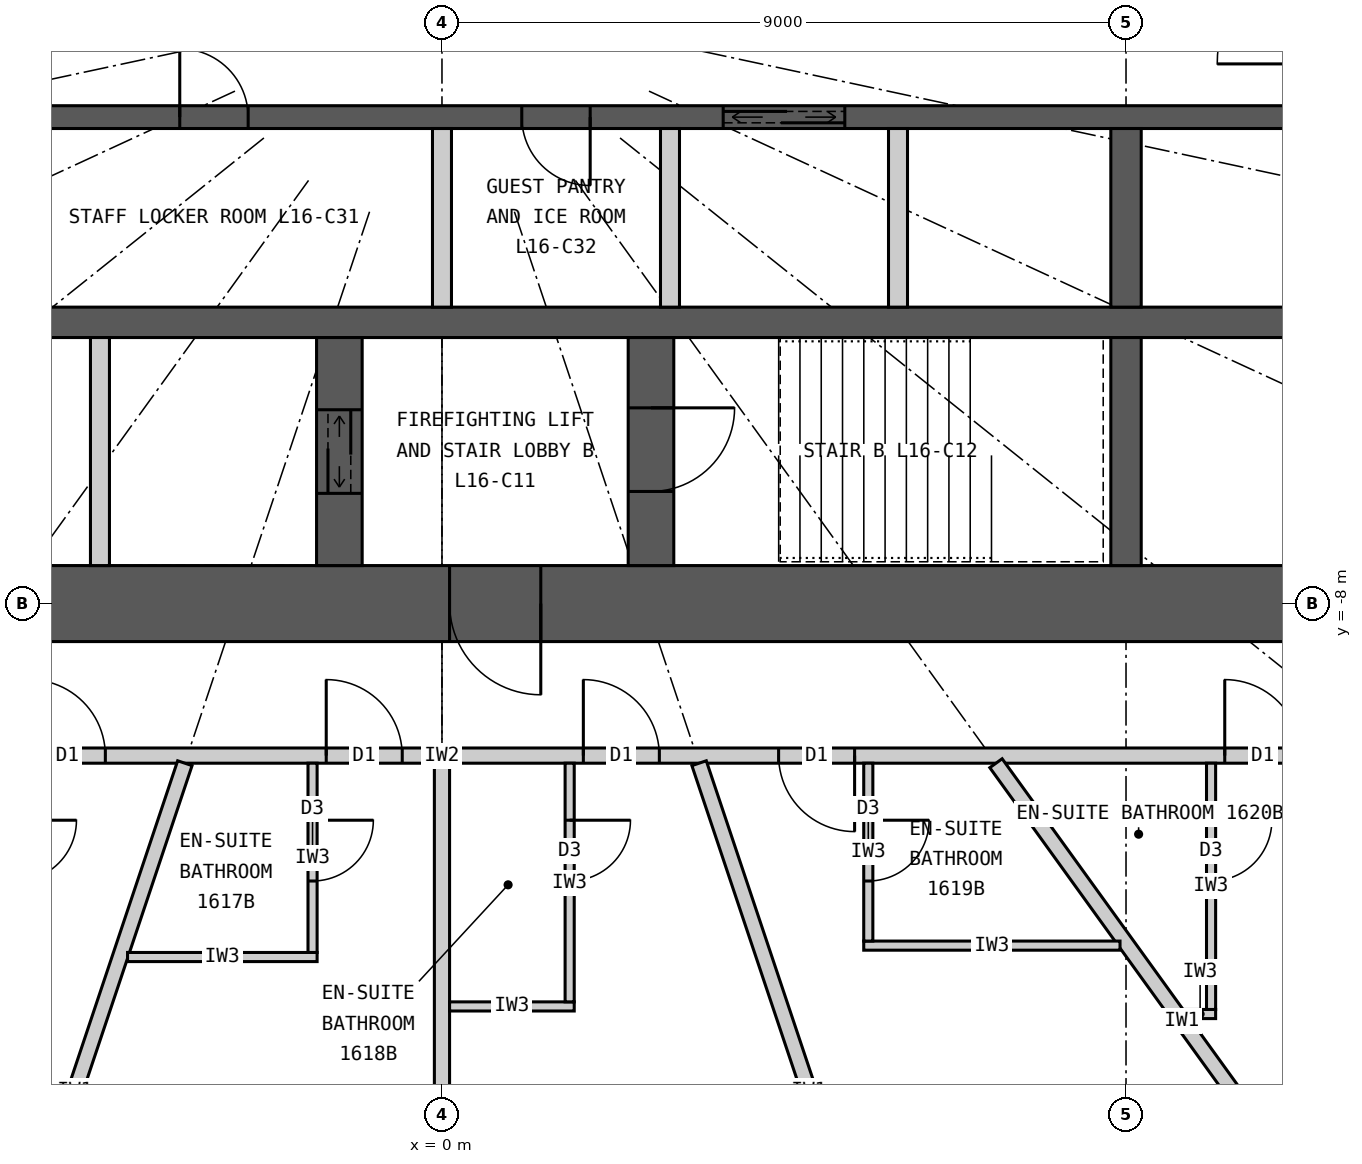
"""IFC4 building model, lengths in metres.
Left out: names, types, materials, properties, quantities, classifications, styles, units other than length and angle.
Written with IfcOpenShell. Run it as: python <this file> out.ifc"""

import sys

from ifc_helpers import new_model, si_unit, direction, frame, frame_2d, origin, place, context, subcontext, project, spatial, rectangle, extrude, element, fill, save


model = new_model("IFC4")
c1 = context("Model", 3, precision=1e-05, world=origin(), true_north=direction((0.0, 1.0)))
c2 = subcontext(c1, "Body", "Model", "MODEL_VIEW")
j1 = project(units=[si_unit("LENGTHUNIT", "METRE"), si_unit("PLANEANGLEUNIT", "RADIAN")], contexts=[c1])
p1 = place(None, origin())
s1 = spatial("IfcSite", under=j1, at=p1, CompositionType="ELEMENT")
p2 = place(p1, origin())
s2 = spatial("IfcBuilding", under=s1, at=p2, CompositionType="ELEMENT")
p3 = place(p2, frame((0.0, 0.0, 67.2)))
s3 = spatial("IfcBuildingStorey", under=s2, at=p3, CompositionType="ELEMENT", Elevation=67.2)
p4 = place(p3, frame((12.5, -8.0, 0.0), z_axis=(0.0, 0.0, 1.0), x_axis=(-1.0, 0.0, 0.0)))
e1 = element("IfcWall", 1, at=p4, inside=s3, PredefinedType="SHEAR", context=c2, shape_type="SweptSolid", body=[
    extrude(rectangle(XDim=25.0, YDim=1.0, at=frame_2d((12.5, 0.0))), origin(), (0.0, 0.0, 1.0), 3.3),
])
p5 = place(p4, frame((11.2, 0.0, 0.0)))
e2 = element("IfcOpeningElement", 2, at=p5, cuts=e1, PredefinedType="OPENING", context=c2, shape_type="SweptSolid", body=[
    extrude(rectangle(XDim=1.2, YDim=2.2, at=frame_2d((0.6, 1.1))), frame((0.0, 0.51, 0.0), z_axis=(0.0, -1.0, 0.0), x_axis=(1.0, 0.0, 0.0)), (0.0, 0.0, 1.0), 1.02),
])
p6 = place(p4, frame((18.8, 0.0, 0.0)))
e3 = element("IfcOpeningElement", 3, at=p6, cuts=e1, PredefinedType="OPENING", context=c2, shape_type="SweptSolid", body=[
    extrude(rectangle(XDim=0.9, YDim=2.2, at=frame_2d((0.45, 1.1))), frame((0.0, 0.51, 0.0), z_axis=(0.0, -1.0, 0.0), x_axis=(1.0, 0.0, 0.0)), (0.0, 0.0, 1.0), 1.02),
])
p7 = place(p3, frame((-11.5, -4.3, 0.0), z_axis=(0.0, 0.0, 1.0), x_axis=(1.0, 0.0, 0.0)))
e4 = element("IfcWall", 4, at=p7, inside=s3, PredefinedType="SHEAR", context=c2, shape_type="SweptSolid", body=[
    extrude(rectangle(XDim=23.0, YDim=0.4, at=frame_2d((11.5, 0.0))), origin(), (0.0, 0.0, 1.0), 3.3),
])
p8 = place(p3, frame((-11.5, -1.6, 0.0), z_axis=(0.0, 0.0, 1.0), x_axis=(1.0, 0.0, 0.0)))
e5 = element("IfcWall", 5, at=p8, inside=s3, PredefinedType="SHEAR", context=c2, shape_type="SweptSolid", body=[
    extrude(rectangle(XDim=23.0, YDim=0.3, at=frame_2d((11.5, 0.0))), origin(), (0.0, 0.0, 1.0), 3.3),
])
p9 = place(p8, frame((0.45, 0.0, 0.0)))
e6 = element("IfcOpeningElement", 6, at=p9, cuts=e5, PredefinedType="OPENING", context=c2, shape_type="SweptSolid", body=[
    extrude(rectangle(XDim=1.1, YDim=2.2, at=frame_2d((0.55, 1.1))), frame((0.0, 0.16, 0.0), z_axis=(0.0, -1.0, 0.0), x_axis=(1.0, 0.0, 0.0)), (0.0, 0.0, 1.0), 0.32),
])
p10 = place(p8, frame((3.45, 0.0, 0.0)))
e7 = element("IfcOpeningElement", 7, at=p10, cuts=e5, PredefinedType="OPENING", context=c2, shape_type="SweptSolid", body=[
    extrude(rectangle(XDim=1.1, YDim=2.2, at=frame_2d((0.55, 1.1))), frame((0.0, 0.16, 0.0), z_axis=(0.0, -1.0, 0.0), x_axis=(1.0, 0.0, 0.0)), (0.0, 0.0, 1.0), 0.32),
])
p11 = place(p8, frame((15.2, 0.0, 0.0)))
e8 = element("IfcOpeningElement", 8, at=p11, cuts=e5, PredefinedType="OPENING", context=c2, shape_type="SweptSolid", body=[
    extrude(rectangle(XDim=1.6, YDim=2.4, at=frame_2d((0.8, 1.2))), frame((0.0, 0.16, 0.0), z_axis=(0.0, -1.0, 0.0), x_axis=(1.0, 0.0, 0.0)), (0.0, 0.0, 1.0), 0.32),
])
p12 = place(p8, frame((8.05, 0.0, 0.0)))
e9 = element("IfcOpeningElement", 9, at=p12, cuts=e5, PredefinedType="OPENING", context=c2, shape_type="SweptSolid", body=[
    extrude(rectangle(XDim=0.9, YDim=2.2, at=frame_2d((0.45, 1.1))), frame((0.0, 0.16, 0.0), z_axis=(0.0, -1.0, 0.0), x_axis=(1.0, 0.0, 0.0)), (0.0, 0.0, 1.0), 0.32),
])
p13 = place(p8, frame((12.55, 0.0, 0.0)))
e10 = element("IfcOpeningElement", 10, at=p13, cuts=e5, PredefinedType="OPENING", context=c2, shape_type="SweptSolid", body=[
    extrude(rectangle(XDim=0.9, YDim=2.2, at=frame_2d((0.45, 1.1))), frame((0.0, 0.16, 0.0), z_axis=(0.0, -1.0, 0.0), x_axis=(1.0, 0.0, 0.0)), (0.0, 0.0, 1.0), 0.32),
])
p14 = place(p3, frame((9.0, -4.1, 0.0), z_axis=(0.0, 0.0, 1.0), x_axis=(0.0, 1.0, 0.0)))
e11 = element("IfcWall", 11, at=p14, inside=s3, PredefinedType="SHEAR", context=c2, shape_type="SweptSolid", body=[
    extrude(rectangle(XDim=2.35, YDim=0.4, at=frame_2d((1.175, 0.0))), origin(), (0.0, 0.0, 1.0), 3.3),
])
p15 = place(p3, frame((9.0, -7.5, 0.0), z_axis=(0.0, 0.0, 1.0), x_axis=(0.0, 1.0, 0.0)))
e12 = element("IfcWall", 12, at=p15, inside=s3, PredefinedType="SHEAR", context=c2, shape_type="SweptSolid", body=[
    extrude(rectangle(XDim=3.0, YDim=0.4, at=frame_2d((1.5, 0.0))), origin(), (0.0, 0.0, 1.0), 3.3),
])
p16 = place(p3, frame((2.75, -7.5, 0.0), z_axis=(0.0, 0.0, 1.0), x_axis=(0.0, 1.0, 0.0)))
e13 = element("IfcWall", 13, at=p16, inside=s3, PredefinedType="SHEAR", context=c2, shape_type="SweptSolid", body=[
    extrude(rectangle(XDim=3.0, YDim=0.6, at=frame_2d((1.5, 0.0))), origin(), (0.0, 0.0, 1.0), 3.3),
])
p17 = place(p16, frame((0.975, 0.0, 0.0)))
e14 = element("IfcOpeningElement", 14, at=p17, cuts=e13, PredefinedType="OPENING", context=c2, shape_type="SweptSolid", body=[
    extrude(rectangle(XDim=1.1, YDim=2.2, at=frame_2d((0.55, 1.1))), frame((0.0, 0.31, 0.0), z_axis=(0.0, -1.0, 0.0), x_axis=(1.0, 0.0, 0.0)), (0.0, 0.0, 1.0), 0.62),
])
p18 = place(p3, frame((-1.35, -7.5, 0.0), z_axis=(0.0, 0.0, 1.0), x_axis=(0.0, 1.0, 0.0)))
e15 = element("IfcWall", 15, at=p18, inside=s3, PredefinedType="SHEAR", context=c2, shape_type="SweptSolid", body=[
    extrude(rectangle(XDim=3.0, YDim=0.6, at=frame_2d((1.5, 0.0))), origin(), (0.0, 0.0, 1.0), 3.3),
])
p19 = place(p18, frame((0.95, 0.0, 0.0)))
e16 = element("IfcOpeningElement", 16, at=p19, cuts=e15, PredefinedType="OPENING", context=c2, shape_type="SweptSolid", body=[
    extrude(rectangle(XDim=1.1, YDim=2.2, at=frame_2d((0.55, 1.1))), frame((0.0, 0.31, 0.0), z_axis=(0.0, -1.0, 0.0), x_axis=(1.0, 0.0, 0.0)), (0.0, 0.0, 1.0), 0.62),
])
p20 = place(p3, frame((-4.5, -7.5, 0.0), z_axis=(0.0, 0.0, 1.0), x_axis=(0.0, 1.0, 0.0)))
e17 = element("IfcWall", 17, at=p20, inside=s3, PredefinedType="PARTITIONING", context=c2, shape_type="SweptSolid", body=[
    extrude(rectangle(XDim=3.0, YDim=0.25, at=frame_2d((1.5, 0.0))), origin(), (0.0, 0.0, 1.0), 3.3),
])
for number, where, z_axis, x_axis in (
    (18, (0.0, -4.1, 0.0), (0.0, 0.0, 1.0), (0.0, 1.0, 0.0)),
    (19, (3.0, -4.1, 0.0), (0.0, 0.0, 1.0), (0.0, 1.0, 0.0)),
    (20, (6.0, -4.1, 0.0), (0.0, 0.0, 1.0), (0.0, 1.0, 0.0)),
):
    element("IfcWall", number, at=place(p3, frame(where, z_axis=z_axis, x_axis=x_axis)), inside=s3, PredefinedType="PARTITIONING", context=c2, shape_type="SweptSolid", body=[
        extrude(rectangle(XDim=2.35, YDim=0.25, at=frame_2d((1.175, 0.0))), origin(), (0.0, 0.0, 1.0), 3.3),
    ])
p21 = place(p3, frame((14.1, -10.0, 0.0), z_axis=(0.0, 0.0, 1.0), x_axis=(-1.0, 0.0, 0.0)))
e21 = element("IfcWall", 21, at=p21, inside=s3, PredefinedType="PARTITIONING", context=c2, shape_type="SweptSolid", body=[
    extrude(rectangle(XDim=28.2, YDim=0.2, at=frame_2d((14.1, 0.0))), origin(), (0.0, 0.0, 1.0), 3.12),
])
p22 = place(p21, frame((23.865, 0.0, 0.0)))
e22 = element("IfcOpeningElement", 22, at=p22, cuts=e21, PredefinedType="OPENING", context=c2, shape_type="SweptSolid", body=[
    extrude(rectangle(XDim=1.0, YDim=2.2, at=frame_2d((0.5, 1.1))), frame((0.0, 0.11, 0.0), z_axis=(0.0, -1.0, 0.0), x_axis=(1.0, 0.0, 0.0)), (0.0, 0.0, 1.0), 0.22),
])
p23 = place(p21, frame((18.529, 0.0, 0.0)))
e23 = element("IfcOpeningElement", 23, at=p23, cuts=e21, PredefinedType="OPENING", context=c2, shape_type="SweptSolid", body=[
    extrude(rectangle(XDim=1.0, YDim=2.2, at=frame_2d((0.5, 1.1))), frame((0.0, 0.11, 0.0), z_axis=(0.0, -1.0, 0.0), x_axis=(1.0, 0.0, 0.0)), (0.0, 0.0, 1.0), 0.22),
])
p24 = place(p21, frame((14.623, 0.0, 0.0)))
e24 = element("IfcOpeningElement", 24, at=p24, cuts=e21, PredefinedType="OPENING", context=c2, shape_type="SweptSolid", body=[
    extrude(rectangle(XDim=1.0, YDim=2.2, at=frame_2d((0.5, 1.1))), frame((0.0, 0.11, 0.0), z_axis=(0.0, -1.0, 0.0), x_axis=(1.0, 0.0, 0.0)), (0.0, 0.0, 1.0), 0.22),
])
p25 = place(p21, frame((11.24, 0.0, 0.0)))
e25 = element("IfcOpeningElement", 25, at=p25, cuts=e21, PredefinedType="OPENING", context=c2, shape_type="SweptSolid", body=[
    extrude(rectangle(XDim=1.0, YDim=2.2, at=frame_2d((0.5, 1.1))), frame((0.0, 0.11, 0.0), z_axis=(0.0, -1.0, 0.0), x_axis=(1.0, 0.0, 0.0)), (0.0, 0.0, 1.0), 0.22),
])
p26 = place(p21, frame((8.671, 0.0, 0.0)))
e26 = element("IfcOpeningElement", 26, at=p26, cuts=e21, PredefinedType="OPENING", context=c2, shape_type="SweptSolid", body=[
    extrude(rectangle(XDim=1.0, YDim=2.2, at=frame_2d((0.5, 1.1))), frame((0.0, 0.11, 0.0), z_axis=(0.0, -1.0, 0.0), x_axis=(1.0, 0.0, 0.0)), (0.0, 0.0, 1.0), 0.22),
])
p27 = place(p21, frame((2.801, 0.0, 0.0)))
e27 = element("IfcOpeningElement", 27, at=p27, cuts=e21, PredefinedType="OPENING", context=c2, shape_type="SweptSolid", body=[
    extrude(rectangle(XDim=1.0, YDim=2.2, at=frame_2d((0.5, 1.1))), frame((0.0, 0.11, 0.0), z_axis=(0.0, -1.0, 0.0), x_axis=(1.0, 0.0, 0.0)), (0.0, 0.0, 1.0), 0.22),
])
p28 = place(p3, frame((-3.383, -10.1, 0.0), z_axis=(0.0, 0.0, 1.0), x_axis=(-0.31759592231, -0.948226149256, 0.0)))
e28 = element("IfcWall", 28, at=p28, inside=s3, PredefinedType="PARTITIONING", context=c2, shape_type="SweptSolid", body=[
    extrude(rectangle(XDim=9.098, YDim=0.2, at=frame_2d((4.549, 0.0))), origin(), (0.0, 0.0, 1.0), 2.32),
])
p29 = place(p3, frame((0.0, -10.1, 0.0), z_axis=(0.0, 0.0, 1.0), x_axis=(0.0, -1.0, 0.0)))
e29 = element("IfcWall", 29, at=p29, inside=s3, PredefinedType="PARTITIONING", context=c2, shape_type="SweptSolid", body=[
    extrude(rectangle(XDim=9.25, YDim=0.2, at=frame_2d((4.625, 0.0))), origin(), (0.0, 0.0, 1.0), 2.32),
])
p30 = place(p3, frame((3.383, -10.1, 0.0), z_axis=(0.0, 0.0, 1.0), x_axis=(0.31759592231, -0.948226149256, 0.0)))
e30 = element("IfcWall", 30, at=p30, inside=s3, PredefinedType="PARTITIONING", context=c2, shape_type="SweptSolid", body=[
    extrude(rectangle(XDim=9.098, YDim=0.2, at=frame_2d((4.549, 0.0))), origin(), (0.0, 0.0, 1.0), 2.32),
])
p31 = place(p3, frame((7.289, -10.1, 0.0), z_axis=(0.0, 0.0, 1.0), x_axis=(0.585198353053, -0.810890182197, 0.0)))
e31 = element("IfcWall", 31, at=p31, inside=s3, PredefinedType="PARTITIONING", context=c2, shape_type="SweptSolid", body=[
    extrude(rectangle(XDim=8.36, YDim=0.2, at=frame_2d((4.18, 0.0))), origin(), (0.0, 0.0, 1.0), 2.32),
])
p32 = place(p3, frame((-4.137, -12.65, 0.0), z_axis=(0.0, 0.0, 1.0), x_axis=(1.0, 0.0, 0.0)))
e32 = element("IfcWall", 32, at=p32, inside=s3, PredefinedType="PARTITIONING", context=c2, shape_type="SweptSolid", body=[
    extrude(rectangle(XDim=2.494, YDim=0.12, at=frame_2d((1.247, 0.0))), origin(), (0.0, 0.0, 1.0), 3.12),
])
p33 = place(p3, frame((-1.703, -10.1, 0.0), z_axis=(0.0, 0.0, 1.0), x_axis=(0.0, -1.0, 0.0)))
e33 = element("IfcWall", 33, at=p33, inside=s3, PredefinedType="PARTITIONING", context=c2, shape_type="SweptSolid", body=[
    extrude(rectangle(XDim=2.49, YDim=0.12, at=frame_2d((1.245, 0.0))), origin(), (0.0, 0.0, 1.0), 3.12),
])
p34 = place(p33, frame((0.75, 0.0, 0.0)))
e34 = element("IfcOpeningElement", 34, at=p34, cuts=e33, PredefinedType="OPENING", context=c2, shape_type="SweptSolid", body=[
    extrude(rectangle(XDim=0.8, YDim=2.1, at=frame_2d((0.4, 1.05))), frame((0.0, 0.07, 0.0), z_axis=(0.0, -1.0, 0.0), x_axis=(1.0, 0.0, 0.0)), (0.0, 0.0, 1.0), 0.14),
])
p35 = place(p3, frame((0.1, -13.3, 0.0), z_axis=(0.0, 0.0, 1.0), x_axis=(1.0, 0.0, 0.0)))
e35 = element("IfcWall", 35, at=p35, inside=s3, PredefinedType="PARTITIONING", context=c2, shape_type="SweptSolid", body=[
    extrude(rectangle(XDim=1.64, YDim=0.12, at=frame_2d((0.82, 0.0))), origin(), (0.0, 0.0, 1.0), 3.12),
])
p36 = place(p3, frame((1.68, -10.1, 0.0), z_axis=(0.0, 0.0, 1.0), x_axis=(0.0, -1.0, 0.0)))
e36 = element("IfcWall", 36, at=p36, inside=s3, PredefinedType="PARTITIONING", context=c2, shape_type="SweptSolid", body=[
    extrude(rectangle(XDim=3.14, YDim=0.12, at=frame_2d((1.57, 0.0))), origin(), (0.0, 0.0, 1.0), 3.12),
])
p37 = place(p36, frame((0.75, 0.0, 0.0)))
e37 = element("IfcOpeningElement", 37, at=p37, cuts=e36, PredefinedType="OPENING", context=c2, shape_type="SweptSolid", body=[
    extrude(rectangle(XDim=0.8, YDim=2.1, at=frame_2d((0.4, 1.05))), frame((0.0, 0.07, 0.0), z_axis=(0.0, -1.0, 0.0), x_axis=(1.0, 0.0, 0.0)), (0.0, 0.0, 1.0), 0.14),
])
p38 = place(p3, frame((8.921, -12.5, 0.0), z_axis=(0.0, 0.0, 1.0), x_axis=(-1.0, 0.0, 0.0)))
e38 = element("IfcWall", 38, at=p38, inside=s3, PredefinedType="PARTITIONING", context=c2, shape_type="SweptSolid", body=[
    extrude(rectangle(XDim=3.372, YDim=0.12, at=frame_2d((1.686, 0.0))), origin(), (0.0, 0.0, 1.0), 3.12),
])
p39 = place(p3, frame((5.609, -10.1, 0.0), z_axis=(0.0, 0.0, 1.0), x_axis=(0.0, -1.0, 0.0)))
e39 = element("IfcWall", 39, at=p39, inside=s3, PredefinedType="PARTITIONING", context=c2, shape_type="SweptSolid", body=[
    extrude(rectangle(XDim=2.34, YDim=0.12, at=frame_2d((1.17, 0.0))), origin(), (0.0, 0.0, 1.0), 3.12),
])
p40 = place(p39, frame((0.75, 0.0, 0.0)))
e40 = element("IfcOpeningElement", 40, at=p40, cuts=e39, PredefinedType="OPENING", context=c2, shape_type="SweptSolid", body=[
    extrude(rectangle(XDim=0.8, YDim=2.1, at=frame_2d((0.4, 1.05))), frame((0.0, 0.07, 0.0), z_axis=(0.0, -1.0, 0.0), x_axis=(1.0, 0.0, 0.0)), (0.0, 0.0, 1.0), 0.14),
])
p41 = place(p3, frame((9.771, -13.4, 0.0), z_axis=(0.0, 0.0, 1.0), x_axis=(1.0, 0.0, 0.0)))
e41 = element("IfcWall", 41, at=p41, inside=s3, PredefinedType="PARTITIONING", context=c2, shape_type="SweptSolid", body=[
    extrude(rectangle(XDim=0.408, YDim=0.12, at=frame_2d((0.204, 0.0))), origin(), (0.0, 0.0, 1.0), 3.12),
])
p42 = place(p3, frame((10.119, -10.1, 0.0), z_axis=(0.0, 0.0, 1.0), x_axis=(0.0, -1.0, 0.0)))
e42 = element("IfcWall", 42, at=p42, inside=s3, PredefinedType="PARTITIONING", context=c2, shape_type="SweptSolid", body=[
    extrude(rectangle(XDim=3.24, YDim=0.12, at=frame_2d((1.62, 0.0))), origin(), (0.0, 0.0, 1.0), 3.12),
])
p43 = place(p42, frame((0.75, 0.0, 0.0)))
e43 = element("IfcOpeningElement", 43, at=p43, cuts=e42, PredefinedType="OPENING", context=c2, shape_type="SweptSolid", body=[
    extrude(rectangle(XDim=0.8, YDim=2.1, at=frame_2d((0.4, 1.05))), frame((0.0, 0.07, 0.0), z_axis=(0.0, -1.0, 0.0), x_axis=(1.0, 0.0, 0.0)), (0.0, 0.0, 1.0), 0.14),
])
p44 = place(p23, origin())
e44 = element("IfcDoor", 44, at=p44, inside=s3, OperationType="SINGLE_SWING_RIGHT", PredefinedType="DOOR", context=c2, shape_type="SweptSolid", body=[
    extrude(rectangle(XDim=1.0, YDim=2.2, at=frame_2d((0.5, 1.1))), frame((0.0, 0.025, 0.0), z_axis=(0.0, -1.0, 0.0), x_axis=(1.0, 0.0, 0.0)), (0.0, 0.0, 1.0), 0.05),
])
fill(e23, e44)
p45 = place(p34, origin())
e45 = element("IfcDoor", 45, at=p45, inside=s3, OperationType="SINGLE_SWING_LEFT", PredefinedType="DOOR", context=c2, shape_type="SweptSolid", body=[
    extrude(rectangle(XDim=0.8, YDim=2.1, at=frame_2d((0.4, 1.05))), frame((0.0, 0.025, 0.0), z_axis=(0.0, -1.0, 0.0), x_axis=(1.0, 0.0, 0.0)), (0.0, 0.0, 1.0), 0.05),
])
fill(e34, e45)
p46 = place(p24, origin())
e46 = element("IfcDoor", 46, at=p46, inside=s3, OperationType="SINGLE_SWING_RIGHT", PredefinedType="DOOR", context=c2, shape_type="SweptSolid", body=[
    extrude(rectangle(XDim=1.0, YDim=2.2, at=frame_2d((0.5, 1.1))), frame((0.0, 0.025, 0.0), z_axis=(0.0, -1.0, 0.0), x_axis=(1.0, 0.0, 0.0)), (0.0, 0.0, 1.0), 0.05),
])
fill(e24, e46)
p47 = place(p37, origin())
e47 = element("IfcDoor", 47, at=p47, inside=s3, OperationType="SINGLE_SWING_LEFT", PredefinedType="DOOR", context=c2, shape_type="SweptSolid", body=[
    extrude(rectangle(XDim=0.8, YDim=2.1, at=frame_2d((0.4, 1.05))), frame((0.0, 0.025, 0.0), z_axis=(0.0, -1.0, 0.0), x_axis=(1.0, 0.0, 0.0)), (0.0, 0.0, 1.0), 0.05),
])
fill(e37, e47)
p48 = place(p25, origin())
e48 = element("IfcDoor", 48, at=p48, inside=s3, OperationType="SINGLE_SWING_RIGHT", PredefinedType="DOOR", context=c2, shape_type="SweptSolid", body=[
    extrude(rectangle(XDim=1.0, YDim=2.2, at=frame_2d((0.5, 1.1))), frame((0.0, 0.025, 0.0), z_axis=(0.0, -1.0, 0.0), x_axis=(1.0, 0.0, 0.0)), (0.0, 0.0, 1.0), 0.05),
])
fill(e25, e48)
p49 = place(p40, origin())
e49 = element("IfcDoor", 49, at=p49, inside=s3, OperationType="SINGLE_SWING_LEFT", PredefinedType="DOOR", context=c2, shape_type="SweptSolid", body=[
    extrude(rectangle(XDim=0.8, YDim=2.1, at=frame_2d((0.4, 1.05))), frame((0.0, 0.025, 0.0), z_axis=(0.0, -1.0, 0.0), x_axis=(1.0, 0.0, 0.0)), (0.0, 0.0, 1.0), 0.05),
])
fill(e40, e49)
p50 = place(p26, origin())
e50 = element("IfcDoor", 50, at=p50, inside=s3, OperationType="SINGLE_SWING_LEFT", PredefinedType="DOOR", context=c2, shape_type="SweptSolid", body=[
    extrude(rectangle(XDim=1.0, YDim=2.2, at=frame_2d((0.5, 1.1))), frame((0.0, 0.025, 0.0), z_axis=(0.0, -1.0, 0.0), x_axis=(1.0, 0.0, 0.0)), (0.0, 0.0, 1.0), 0.05),
])
fill(e26, e50)
p51 = place(p43, origin())
e51 = element("IfcDoor", 51, at=p51, inside=s3, OperationType="SINGLE_SWING_LEFT", PredefinedType="DOOR", context=c2, shape_type="SweptSolid", body=[
    extrude(rectangle(XDim=0.8, YDim=2.1, at=frame_2d((0.4, 1.05))), frame((0.0, 0.025, 0.0), z_axis=(0.0, -1.0, 0.0), x_axis=(1.0, 0.0, 0.0)), (0.0, 0.0, 1.0), 0.05),
])
fill(e43, e51)
p52 = place(p27, origin())
e52 = element("IfcDoor", 52, at=p52, inside=s3, OperationType="SINGLE_SWING_RIGHT", PredefinedType="DOOR", context=c2, shape_type="SweptSolid", body=[
    extrude(rectangle(XDim=1.0, YDim=2.2, at=frame_2d((0.5, 1.1))), frame((0.0, 0.025, 0.0), z_axis=(0.0, -1.0, 0.0), x_axis=(1.0, 0.0, 0.0)), (0.0, 0.0, 1.0), 0.05),
])
fill(e27, e52)
p53 = place(p5, origin())
e53 = element("IfcDoor", 53, at=p53, inside=s3, OperationType="SINGLE_SWING_LEFT", PredefinedType="DOOR", context=c2, shape_type="SweptSolid", body=[
    extrude(rectangle(XDim=1.2, YDim=2.2, at=frame_2d((0.6, 1.1))), frame((0.0, 0.025, 0.0), z_axis=(0.0, -1.0, 0.0), x_axis=(1.0, 0.0, 0.0)), (0.0, 0.0, 1.0), 0.05),
])
fill(e2, e53)
p54 = place(p17, origin())
e54 = element("IfcDoor", 54, at=p54, inside=s3, OperationType="SINGLE_SWING_RIGHT", PredefinedType="DOOR", context=c2, shape_type="SweptSolid", body=[
    extrude(rectangle(XDim=1.1, YDim=2.2, at=frame_2d((0.55, 1.1))), frame((0.0, 0.025, 0.0), z_axis=(0.0, -1.0, 0.0), x_axis=(1.0, 0.0, 0.0)), (0.0, 0.0, 1.0), 0.05),
])
fill(e14, e54)
p55 = place(p19, origin())
e55 = element("IfcDoor", 55, at=p55, inside=s3, OperationType="DOUBLE_DOOR_SLIDING", PredefinedType="DOOR", context=c2, shape_type="SweptSolid", body=[
    extrude(rectangle(XDim=1.1, YDim=2.2, at=frame_2d((0.55, 1.1))), frame((0.0, 0.025, 0.0), z_axis=(0.0, -1.0, 0.0), x_axis=(1.0, 0.0, 0.0)), (0.0, 0.0, 1.0), 0.05),
])
fill(e16, e55)
p56 = place(p11, origin())
e56 = element("IfcDoor", 56, at=p56, inside=s3, OperationType="DOUBLE_DOOR_SLIDING", PredefinedType="DOOR", context=c2, shape_type="SweptSolid", body=[
    extrude(rectangle(XDim=1.6, YDim=2.4, at=frame_2d((0.8, 1.2))), frame((0.0, 0.025, 0.0), z_axis=(0.0, -1.0, 0.0), x_axis=(1.0, 0.0, 0.0)), (0.0, 0.0, 1.0), 0.05),
])
fill(e8, e56)
p57 = place(p12, origin())
e57 = element("IfcDoor", 57, at=p57, inside=s3, OperationType="SINGLE_SWING_LEFT", PredefinedType="DOOR", context=c2, shape_type="SweptSolid", body=[
    extrude(rectangle(XDim=0.9, YDim=2.2, at=frame_2d((0.45, 1.1))), frame((0.0, 0.025, 0.0), z_axis=(0.0, -1.0, 0.0), x_axis=(1.0, 0.0, 0.0)), (0.0, 0.0, 1.0), 0.05),
])
fill(e9, e57)
p58 = place(p13, origin())
e58 = element("IfcDoor", 58, at=p58, inside=s3, OperationType="SINGLE_SWING_RIGHT", PredefinedType="DOOR", context=c2, shape_type="SweptSolid", body=[
    extrude(rectangle(XDim=0.9, YDim=2.2, at=frame_2d((0.45, 1.1))), frame((0.0, 0.025, 0.0), z_axis=(0.0, -1.0, 0.0), x_axis=(1.0, 0.0, 0.0)), (0.0, 0.0, 1.0), 0.05),
])
fill(e10, e58)
save(model, sys.argv[1])
